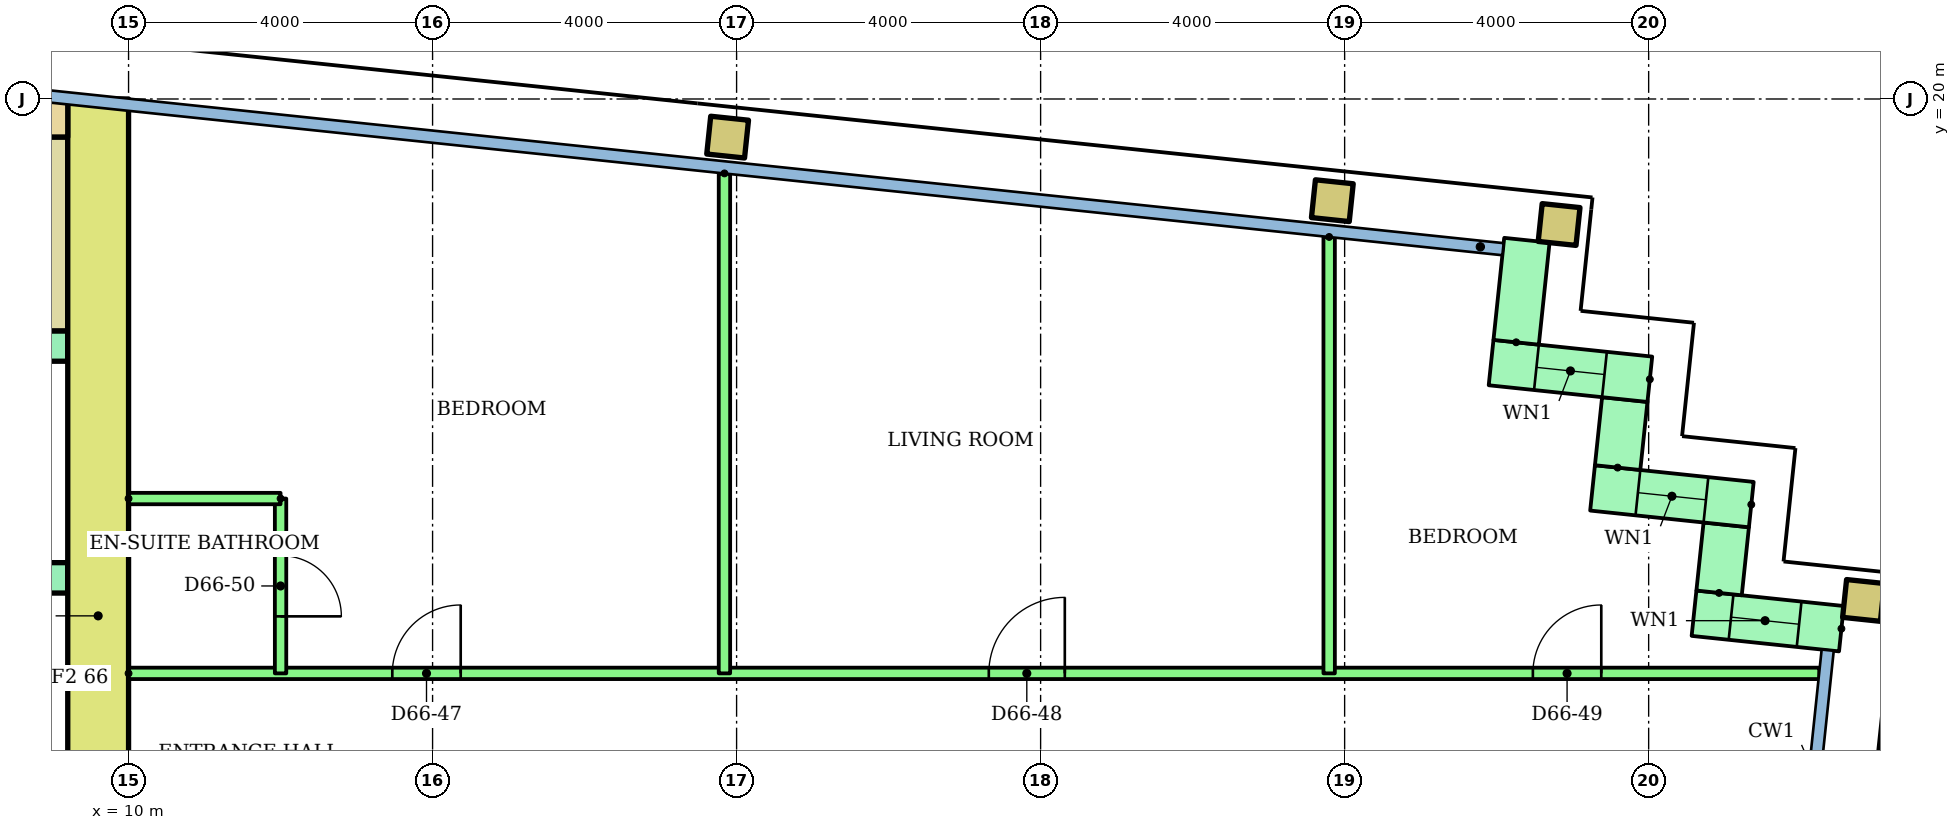
"""IFC4 building model, lengths in metres.
Left out: names, types, materials, properties, quantities, classifications, styles, units other than length and angle.
Written with IfcOpenShell. Run it as: python <this file> out.ifc"""

import sys

from ifc_helpers import new_model, si_unit, direction, frame, frame_2d, origin, origin_2d, place, context, subcontext, project, spatial, rectangle, hollow_rectangle, extrude, element, fill, save


model = new_model("IFC4")
c1 = context("Model", 3, precision=1e-05, world=origin(), true_north=direction((0.0, 1.0)))
c2 = subcontext(c1, "Body", "Model", "MODEL_VIEW")
j1 = project(units=[si_unit("LENGTHUNIT", "METRE"), si_unit("PLANEANGLEUNIT", "RADIAN")], contexts=[c1])
p1 = place(None, origin())
s1 = spatial("IfcSite", under=j1, at=p1, CompositionType="ELEMENT")
p2 = place(p1, origin())
s2 = spatial("IfcBuilding", under=s1, at=p2, CompositionType="ELEMENT")
p3 = place(p2, frame((0.0, 0.0, 256.3)))
s3 = spatial("IfcBuildingStorey", under=s2, at=p3, CompositionType="ELEMENT", Elevation=256.3)
for number, where, z_axis, x_axis in (
    (1, (32.827, 13.403, 0.0), (0.0, 0.0, 1.0), (0.995, -0.105, 0.0)),
    (2, (17.882, 19.498, 0.0), (0.0, 0.0, 1.0), (0.995, -0.105, 0.0)),
    (3, (25.838, 18.662, 0.0), (0.0, 0.0, 1.0), (0.995, -0.105, 0.0)),
    (4, (28.822, 18.349, 0.0), (0.0, 0.0, 1.0), (0.995, -0.105, 0.0)),
):
    element("IfcColumn", number, at=place(p3, frame(where, z_axis=z_axis, x_axis=x_axis)), inside=s3, PredefinedType="COLUMN", context=c2, shape_type="SweptSolid", body=[
        extrude(hollow_rectangle(XDim=0.5, YDim=0.5, WallThickness=0.025, at=origin_2d()), origin(), (0.0, 0.0, 1.0), 3.2),
    ])
p4 = place(p3, frame((32.536, 13.031, 0.0), z_axis=(0.0, 0.0, 1.0), x_axis=(-0.994534226826, 0.104411070641, 0.0)))
e5 = element("IfcWall", 5, at=p4, inside=s3, PredefinedType="STANDARD", context=c2, shape_type="SweptSolid", body=[
    extrude(rectangle(XDim=1.95, YDim=0.6, at=frame_2d((0.975, 0.0))), origin(), (0.0, 0.0, 1.0), 2.92),
])
p5 = place(p4, frame((0.56, 0.0, 0.9)))
e6 = element("IfcOpeningElement", 6, at=p5, cuts=e5, PredefinedType="OPENING", context=c2, shape_type="SweptSolid", body=[
    extrude(rectangle(XDim=0.9, YDim=1.5, at=frame_2d((0.45, 0.75))), frame((0.0, 0.31, 0.0), z_axis=(0.0, -1.0, 0.0), x_axis=(1.0, 0.0, 0.0)), (0.0, 0.0, 1.0), 0.62),
])
p6 = place(p3, frame((30.927, 13.502, 0.0), z_axis=(0.0, 0.0, 1.0), x_axis=(0.104416541099, 0.994533652495, 0.0)))
e7 = element("IfcWall", 7, at=p6, inside=s3, PredefinedType="STANDARD", context=c2, shape_type="SweptSolid", body=[
    extrude(rectangle(XDim=0.9, YDim=0.6, at=frame_2d((0.45, 0.0))), origin(), (0.0, 0.0, 1.0), 2.92),
])
p7 = place(p3, frame((31.351, 14.664, 0.0), z_axis=(0.0, 0.0, 1.0), x_axis=(-0.994523910136, 0.104509292252, 0.0)))
e8 = element("IfcWall", 8, at=p7, inside=s3, PredefinedType="STANDARD", context=c2, shape_type="SweptSolid", body=[
    extrude(rectangle(XDim=2.1, YDim=0.6, at=frame_2d((1.05, 0.0))), origin(), (0.0, 0.0, 1.0), 2.92),
])
p8 = place(p7, frame((0.6, 0.0, 0.9)))
e9 = element("IfcOpeningElement", 9, at=p8, cuts=e8, PredefinedType="OPENING", context=c2, shape_type="SweptSolid", body=[
    extrude(rectangle(XDim=0.9, YDim=1.5, at=frame_2d((0.45, 0.75))), frame((0.0, 0.31, 0.0), z_axis=(0.0, -1.0, 0.0), x_axis=(1.0, 0.0, 0.0)), (0.0, 0.0, 1.0), 0.62),
])
p9 = place(p3, frame((29.592, 15.151, 0.0), z_axis=(0.0, 0.0, 1.0), x_axis=(0.104444712852, 0.994530694326, 0.0)))
e10 = element("IfcWall", 10, at=p9, inside=s3, PredefinedType="STANDARD", context=c2, shape_type="SweptSolid", body=[
    extrude(rectangle(XDim=0.9, YDim=0.6, at=frame_2d((0.45, 0.0))), origin(), (0.0, 0.0, 1.0), 2.92),
])
p10 = place(p3, frame((30.015, 16.312, 0.0), z_axis=(0.0, 0.0, 1.0), x_axis=(-0.994510548187, 0.104636368175, 0.0)))
e11 = element("IfcWall", 11, at=p10, inside=s3, PredefinedType="STANDARD", context=c2, shape_type="SweptSolid", body=[
    extrude(rectangle(XDim=2.1, YDim=0.6, at=frame_2d((1.05, 0.0))), origin(), (0.0, 0.0, 1.0), 2.92),
])
p11 = place(p10, frame((0.6, 0.0, 0.9)))
e12 = element("IfcOpeningElement", 12, at=p11, cuts=e11, PredefinedType="OPENING", context=c2, shape_type="SweptSolid", body=[
    extrude(rectangle(XDim=0.9, YDim=1.5, at=frame_2d((0.45, 0.75))), frame((0.0, 0.31, 0.0), z_axis=(0.0, -1.0, 0.0), x_axis=(1.0, 0.0, 0.0)), (0.0, 0.0, 1.0), 0.62),
])
p12 = place(p3, frame((28.257, 16.799, 0.0), z_axis=(0.0, 0.0, 1.0), x_axis=(0.104534153452, 0.994521297289, 0.0)))
e13 = element("IfcWall", 13, at=p12, inside=s3, PredefinedType="STANDARD", context=c2, shape_type="SweptSolid", body=[
    extrude(rectangle(XDim=1.35, YDim=0.6, at=frame_2d((0.675, 0.0))), origin(), (0.0, 0.0, 1.0), 2.92),
])
p13 = place(p3, frame((9.6, 6.4, 0.0), z_axis=(0.0, 0.0, 1.0), x_axis=(0.0, 1.0, 0.0)))
e14 = element("IfcWall", 14, at=p13, inside=s3, PredefinedType="SHEAR", context=c2, shape_type="SweptSolid", body=[
    extrude(rectangle(XDim=13.6, YDim=0.8, at=frame_2d((6.8, 0.0))), origin(), (0.0, 0.0, 1.0), 2.92),
])
p14 = place(p3, frame((-9.2, 19.75, 0.0)))
e15 = element("IfcWall", 15, at=p14, inside=s3, PredefinedType="SHEAR", context=c2, shape_type="SweptSolid", body=[
    extrude(rectangle(XDim=18.4, YDim=0.5, at=frame_2d((9.2, 0.0))), origin(), (0.0, 0.0, 1.0), 2.92),
])
p15 = place(p3, frame((1.2, 13.7, 0.0)))
e16 = element("IfcWall", 16, at=p15, inside=s3, PredefinedType="SHEAR", context=c2, shape_type="SweptSolid", body=[
    extrude(rectangle(XDim=8.0, YDim=0.4, at=frame_2d((4.0, 0.0))), origin(), (0.0, 0.0, 1.0), 2.92),
])
p16 = place(p3, frame((-9.2, 16.75, 0.0)))
e17 = element("IfcWall", 17, at=p16, inside=s3, PredefinedType="SHEAR", context=c2, shape_type="SweptSolid", body=[
    extrude(rectangle(XDim=18.4, YDim=0.4, at=frame_2d((9.2, 0.0))), origin(), (0.0, 0.0, 1.0), 2.92),
])
p17 = place(p16, frame((0.1, 0.0, 0.0)))
e18 = element("IfcOpeningElement", 18, at=p17, cuts=e17, PredefinedType="OPENING", context=c2, shape_type="SweptSolid", body=[
    extrude(rectangle(XDim=0.95, YDim=2.1, at=frame_2d((0.475, 1.05))), frame((0.0, 0.21, 0.0), z_axis=(0.0, -1.0, 0.0), x_axis=(1.0, 0.0, 0.0)), (0.0, 0.0, 1.0), 0.42),
])
p18 = place(p16, frame((6.1, 0.0, 0.0)))
e19 = element("IfcOpeningElement", 19, at=p18, cuts=e17, PredefinedType="OPENING", context=c2, shape_type="SweptSolid", body=[
    extrude(rectangle(XDim=0.95, YDim=2.1, at=frame_2d((0.475, 1.05))), frame((0.0, 0.21, 0.0), z_axis=(0.0, -1.0, 0.0), x_axis=(1.0, 0.0, 0.0)), (0.0, 0.0, 1.0), 0.42),
])
p19 = place(p16, frame((12.1, 0.0, 0.0)))
e20 = element("IfcOpeningElement", 20, at=p19, cuts=e17, PredefinedType="OPENING", context=c2, shape_type="SweptSolid", body=[
    extrude(rectangle(XDim=0.95, YDim=2.1, at=frame_2d((0.475, 1.05))), frame((0.0, 0.21, 0.0), z_axis=(0.0, -1.0, 0.0), x_axis=(1.0, 0.0, 0.0)), (0.0, 0.0, 1.0), 0.42),
])
p20 = place(p3, frame((8.75, 16.95, 0.0), z_axis=(0.0, 0.0, 1.0), x_axis=(0.0, 1.0, 0.0)))
e21 = element("IfcWall", 21, at=p20, inside=s3, PredefinedType="SHEAR", context=c2, shape_type="SweptSolid", body=[
    extrude(rectangle(XDim=2.55, YDim=0.9, at=frame_2d((1.275, 0.0))), origin(), (0.0, 0.0, 1.0), 2.92),
])
p21 = place(p3, frame((10.0, 12.443, 0.0)))
e22 = element("IfcWall", 22, at=p21, inside=s3, PredefinedType="PARTITIONING", context=c2, shape_type="SweptSolid", body=[
    extrude(rectangle(XDim=22.244, YDim=0.15, at=frame_2d((11.122, 0.0))), origin(), (0.0, 0.0, 1.0), 2.4),
])
p22 = place(p21, frame((3.47, 0.0, 0.0)))
e23 = element("IfcOpeningElement", 23, at=p22, cuts=e22, PredefinedType="OPENING", context=c2, shape_type="SweptSolid", body=[
    extrude(rectangle(XDim=0.9, YDim=2.1, at=frame_2d((0.45, 1.05))), frame((0.0, 0.085, 0.0), z_axis=(0.0, -1.0, 0.0), x_axis=(1.0, 0.0, 0.0)), (0.0, 0.0, 1.0), 0.17),
])
p23 = place(p21, frame((11.318, 0.0, 0.0)))
e24 = element("IfcOpeningElement", 24, at=p23, cuts=e22, PredefinedType="OPENING", context=c2, shape_type="SweptSolid", body=[
    extrude(rectangle(XDim=1.0, YDim=2.1, at=frame_2d((0.5, 1.05))), frame((0.0, 0.085, 0.0), z_axis=(0.0, -1.0, 0.0), x_axis=(1.0, 0.0, 0.0)), (0.0, 0.0, 1.0), 0.17),
])
p24 = place(p21, frame((18.477, 0.0, 0.0)))
e25 = element("IfcOpeningElement", 25, at=p24, cuts=e22, PredefinedType="OPENING", context=c2, shape_type="SweptSolid", body=[
    extrude(rectangle(XDim=0.9, YDim=2.1, at=frame_2d((0.45, 1.05))), frame((0.0, 0.085, 0.0), z_axis=(0.0, -1.0, 0.0), x_axis=(1.0, 0.0, 0.0)), (0.0, 0.0, 1.0), 0.17),
])
p25 = place(p3, frame((17.84, 19.021, 0.0), z_axis=(0.0, 0.0, 1.0), x_axis=(0.0, -1.0, 0.0)))
e26 = element("IfcWall", 26, at=p25, inside=s3, PredefinedType="PARTITIONING", context=c2, shape_type="SweptSolid", body=[
    extrude(rectangle(XDim=6.578, YDim=0.15, at=frame_2d((3.289, 0.0))), origin(), (0.0, 0.0, 1.0), 2.4),
])
p26 = place(p3, frame((25.796, 18.185, 0.0), z_axis=(0.0, 0.0, 1.0), x_axis=(0.0, -1.0, 0.0)))
e27 = element("IfcWall", 27, at=p26, inside=s3, PredefinedType="PARTITIONING", context=c2, shape_type="SweptSolid", body=[
    extrude(rectangle(XDim=5.741, YDim=0.15, at=frame_2d((2.871, 0.0))), origin(), (0.0, 0.0, 1.0), 2.4),
])
p27 = place(p3, frame((12.0, 14.743, 0.0), z_axis=(0.0, 0.0, 1.0), x_axis=(0.0, -1.0, 0.0)))
e28 = element("IfcWall", 28, at=p27, inside=s3, PredefinedType="PARTITIONING", context=c2, shape_type="SweptSolid", body=[
    extrude(rectangle(XDim=2.3, YDim=0.15, at=frame_2d((1.15, 0.0))), origin(), (0.0, 0.0, 1.0), 2.4),
])
p28 = place(p27, frame((0.75, 0.0, 0.0)))
e29 = element("IfcOpeningElement", 29, at=p28, cuts=e28, PredefinedType="OPENING", context=c2, shape_type="SweptSolid", body=[
    extrude(rectangle(XDim=0.8, YDim=2.1, at=frame_2d((0.4, 1.05))), frame((0.0, 0.085, 0.0), z_axis=(0.0, -1.0, 0.0), x_axis=(1.0, 0.0, 0.0)), (0.0, 0.0, 1.0), 0.17),
])
p29 = place(p3, frame((10.0, 14.743, 0.0)))
e30 = element("IfcWall", 30, at=p29, inside=s3, PredefinedType="PARTITIONING", context=c2, shape_type="SweptSolid", body=[
    extrude(rectangle(XDim=2.0, YDim=0.15, at=frame_2d((1.0, 0.0))), origin(), (0.0, 0.0, 1.0), 2.4),
])
p30 = place(p5, origin())
e31 = element("IfcWindow", 31, at=p30, inside=s3, PartitioningType="SINGLE_PANEL", PredefinedType="WINDOW", context=c2, shape_type="SweptSolid", body=[
    extrude(rectangle(XDim=0.9, YDim=1.5, at=frame_2d((0.45, 0.75))), frame((0.0, 0.03, 0.0), z_axis=(0.0, -1.0, 0.0), x_axis=(1.0, 0.0, 0.0)), (0.0, 0.0, 1.0), 0.06),
])
fill(e6, e31)
p31 = place(p8, origin())
e32 = element("IfcWindow", 32, at=p31, inside=s3, PartitioningType="SINGLE_PANEL", PredefinedType="WINDOW", context=c2, shape_type="SweptSolid", body=[
    extrude(rectangle(XDim=0.9, YDim=1.5, at=frame_2d((0.45, 0.75))), frame((0.0, 0.03, 0.0), z_axis=(0.0, -1.0, 0.0), x_axis=(1.0, 0.0, 0.0)), (0.0, 0.0, 1.0), 0.06),
])
fill(e9, e32)
p32 = place(p11, origin())
e33 = element("IfcWindow", 33, at=p32, inside=s3, PartitioningType="SINGLE_PANEL", PredefinedType="WINDOW", context=c2, shape_type="SweptSolid", body=[
    extrude(rectangle(XDim=0.9, YDim=1.5, at=frame_2d((0.45, 0.75))), frame((0.0, 0.03, 0.0), z_axis=(0.0, -1.0, 0.0), x_axis=(1.0, 0.0, 0.0)), (0.0, 0.0, 1.0), 0.06),
])
fill(e12, e33)
p33 = place(p22, origin())
e34 = element("IfcDoor", 34, at=p33, inside=s3, OperationType="SINGLE_SWING_RIGHT", PredefinedType="DOOR", context=c2, shape_type="SweptSolid", body=[
    extrude(rectangle(XDim=0.9, YDim=2.1, at=frame_2d((0.45, 1.05))), frame((0.0, 0.025, 0.0), z_axis=(0.0, -1.0, 0.0), x_axis=(1.0, 0.0, 0.0)), (0.0, 0.0, 1.0), 0.05),
])
fill(e23, e34)
p34 = place(p23, origin())
e35 = element("IfcDoor", 35, at=p34, inside=s3, OperationType="SINGLE_SWING_RIGHT", PredefinedType="DOOR", context=c2, shape_type="SweptSolid", body=[
    extrude(rectangle(XDim=1.0, YDim=2.1, at=frame_2d((0.5, 1.05))), frame((0.0, 0.025, 0.0), z_axis=(0.0, -1.0, 0.0), x_axis=(1.0, 0.0, 0.0)), (0.0, 0.0, 1.0), 0.05),
])
fill(e24, e35)
p35 = place(p24, origin())
e36 = element("IfcDoor", 36, at=p35, inside=s3, OperationType="SINGLE_SWING_RIGHT", PredefinedType="DOOR", context=c2, shape_type="SweptSolid", body=[
    extrude(rectangle(XDim=0.9, YDim=2.1, at=frame_2d((0.45, 1.05))), frame((0.0, 0.025, 0.0), z_axis=(0.0, -1.0, 0.0), x_axis=(1.0, 0.0, 0.0)), (0.0, 0.0, 1.0), 0.05),
])
fill(e25, e36)
p36 = place(p28, origin())
e37 = element("IfcDoor", 37, at=p36, inside=s3, OperationType="SINGLE_SWING_RIGHT", PredefinedType="DOOR", context=c2, shape_type="SweptSolid", body=[
    extrude(rectangle(XDim=0.8, YDim=2.1, at=frame_2d((0.4, 1.05))), frame((0.0, 0.025, 0.0), z_axis=(0.0, -1.0, 0.0), x_axis=(1.0, 0.0, 0.0)), (0.0, 0.0, 1.0), 0.05),
])
fill(e29, e37)
save(model, sys.argv[1])
